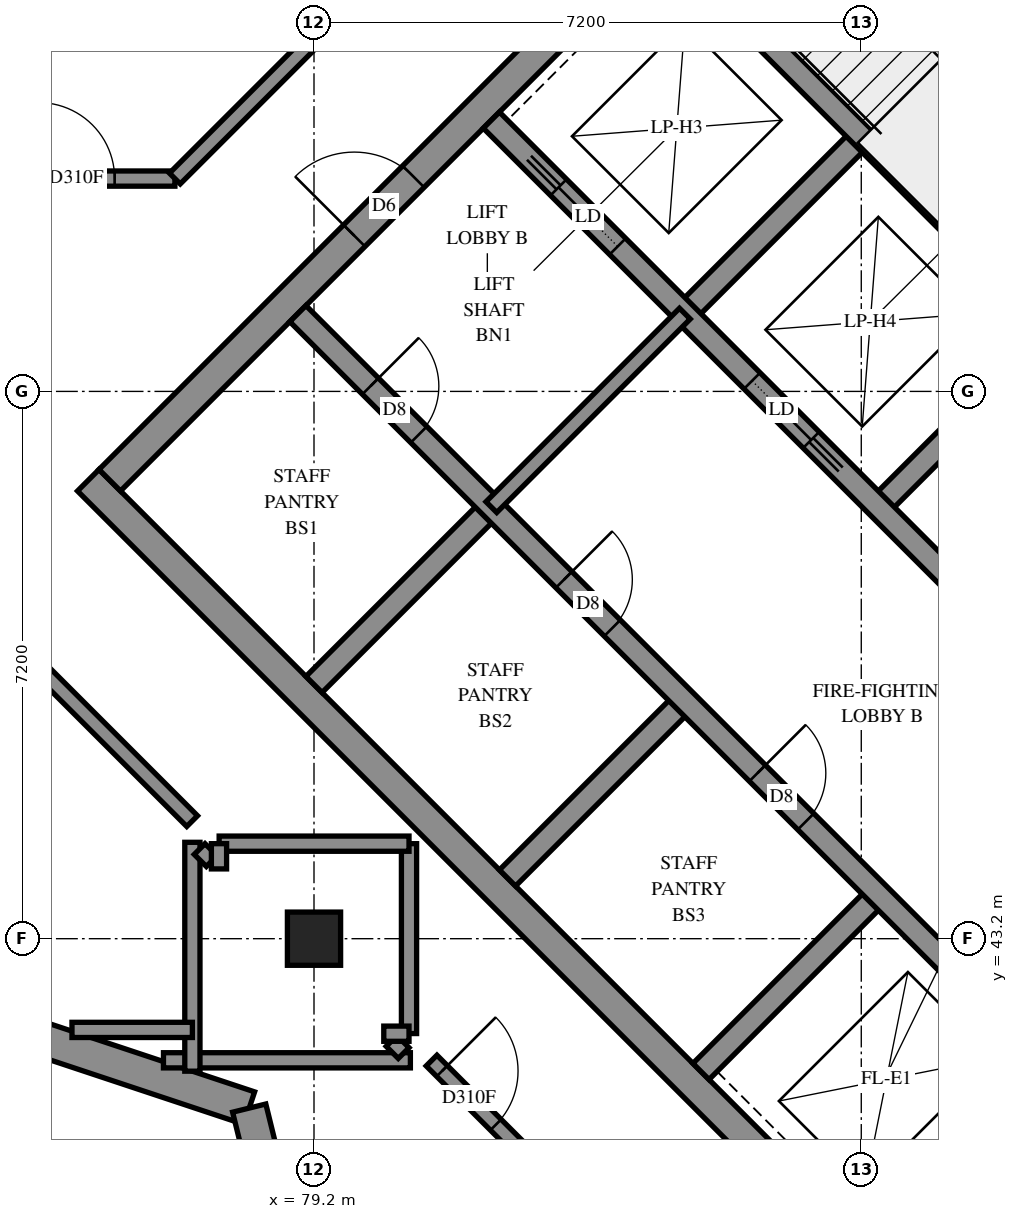
"""IFC4 building model, lengths in metres.
Left out: names, types, materials, properties, quantities, classifications, styles, units other than length and angle.
Written with IfcOpenShell. Run it as: python <this file> out.ifc"""

import sys

from ifc_helpers import new_model, si_unit, direction, frame, frame_2d, origin, origin_2d, place, context, subcontext, project, spatial, polyline, rectangle, outline, extrude, element, fill, save


model = new_model("IFC4")
c1 = context("Model", 3, precision=1e-05, world=origin(), true_north=direction((0.0, 1.0)))
c2 = subcontext(c1, "Body", "Model", "MODEL_VIEW")
j1 = project(units=[si_unit("LENGTHUNIT", "METRE"), si_unit("PLANEANGLEUNIT", "RADIAN")], contexts=[c1])
p1 = place(None, origin())
s1 = spatial("IfcSite", under=j1, at=p1, CompositionType="ELEMENT")
p2 = place(p1, origin())
s2 = spatial("IfcBuilding", under=s1, at=p2, CompositionType="ELEMENT")
p3 = place(p2, frame((0.0, 0.0, 277.8)))
s3 = spatial("IfcBuildingStorey", under=s2, at=p3, CompositionType="ELEMENT", Elevation=277.8)
p4 = place(p3, frame((79.2, 43.2, 0.0), z_axis=(0.0, 0.0, 1.0), x_axis=(1.0, 0.0, 0.0)))
e1 = element("IfcColumn", 1, at=p4, inside=s3, PredefinedType="COLUMN", context=c2, shape_type="SweptSolid", body=[
    extrude(rectangle(XDim=0.7, YDim=0.7, at=origin_2d()), origin(), (0.0, 0.0, 1.0), 3.1),
])
p5 = place(p3, frame((76.23, 49.231, -0.3), z_axis=(0.0, 0.0, 1.0), x_axis=(0.7071034917, -0.7071100706, 0.0)))
e2 = element("IfcWall", 2, at=p5, inside=s3, PredefinedType="SHEAR", context=c2, shape_type="SweptSolid", body=[
    extrude(rectangle(XDim=15.2, YDim=0.4, at=frame_2d((7.6, 0.0))), origin(), (0.0, 0.0, 1.0), 2.7),
])
p6 = place(p3, frame((86.695, 59.696, -0.3), z_axis=(0.0, 0.0, 1.0), x_axis=(0.7071100706, -0.7071034917, 0.0)))
e3 = element("IfcWall", 3, at=p6, inside=s3, PredefinedType="SHEAR", context=c2, shape_type="SweptSolid", body=[
    extrude(rectangle(XDim=15.2, YDim=0.4, at=frame_2d((7.6, 0.0))), origin(), (0.0, 0.0, 1.0), 2.7),
])
p7 = place(p6, frame((10.4, 0.0, 0.3)))
e4 = element("IfcOpeningElement", 4, at=p7, cuts=e3, PredefinedType="OPENING", context=c2, shape_type="SweptSolid", body=[
    extrude(rectangle(XDim=0.8, YDim=2.1, at=frame_2d((0.4, 1.05))), frame((0.0, 0.21, 0.0), z_axis=(0.0, -1.0, 0.0), x_axis=(1.0, 0.0, 0.0)), (0.0, 0.0, 1.0), 0.42),
])
p8 = place(p3, frame((76.513, 49.231, -0.3), z_axis=(0.0, 0.0, 1.0), x_axis=(0.7071067812, 0.7071067812, 0.0)))
e5 = element("IfcWall", 5, at=p8, inside=s3, PredefinedType="SHEAR", context=c2, shape_type="SweptSolid", body=[
    extrude(rectangle(XDim=14.4, YDim=0.4, at=frame_2d((7.2, 0.0))), origin(), (0.0, 0.0, 1.0), 2.7),
])
p9 = place(p8, frame((4.55, 0.0, 0.3)))
e6 = element("IfcOpeningElement", 6, at=p9, cuts=e5, PredefinedType="OPENING", context=c2, shape_type="SweptSolid", body=[
    extrude(rectangle(XDim=1.1, YDim=2.1, at=frame_2d((0.55, 1.05))), frame((0.0, 0.21, 0.0), z_axis=(0.0, -1.0, 0.0), x_axis=(1.0, 0.0, 0.0)), (0.0, 0.0, 1.0), 0.42),
])
p10 = place(p8, frame((11.35, 0.0, 0.3)))
e7 = element("IfcOpeningElement", 7, at=p10, cuts=e5, PredefinedType="OPENING", context=c2, shape_type="SweptSolid", body=[
    extrude(rectangle(XDim=1.1, YDim=2.1, at=frame_2d((0.55, 1.05))), frame((0.0, 0.21, 0.0), z_axis=(0.0, -1.0, 0.0), x_axis=(1.0, 0.0, 0.0)), (0.0, 0.0, 1.0), 0.42),
])
p11 = place(p3, frame((86.978, 38.766, -0.3), z_axis=(0.0, 0.0, 1.0), x_axis=(0.7071067812, 0.7071067812, 0.0)))
e8 = element("IfcWall", 8, at=p11, inside=s3, PredefinedType="SHEAR", context=c2, shape_type="SweptSolid", body=[
    extrude(rectangle(XDim=14.4, YDim=0.4, at=frame_2d((7.2, 0.0))), origin(), (0.0, 0.0, 1.0), 2.7),
])
p12 = place(p11, frame((4.55, 0.0, 0.3)))
e9 = element("IfcOpeningElement", 9, at=p12, cuts=e8, PredefinedType="OPENING", context=c2, shape_type="SweptSolid", body=[
    extrude(rectangle(XDim=1.1, YDim=2.1, at=frame_2d((0.55, 1.05))), frame((0.0, 0.21, 0.0), z_axis=(0.0, -1.0, 0.0), x_axis=(1.0, 0.0, 0.0)), (0.0, 0.0, 1.0), 0.42),
])
p13 = place(p11, frame((11.35, 0.0, 0.3)))
e10 = element("IfcOpeningElement", 10, at=p13, cuts=e8, PredefinedType="OPENING", context=c2, shape_type="SweptSolid", body=[
    extrude(rectangle(XDim=1.1, YDim=2.1, at=frame_2d((0.55, 1.05))), frame((0.0, 0.21, 0.0), z_axis=(0.0, -1.0, 0.0), x_axis=(1.0, 0.0, 0.0)), (0.0, 0.0, 1.0), 0.42),
])
for number, where, z_axis, x_axis in (
    (11, (79.2, 46.544, 0.0), (0.0, 0.0, 1.0), (0.707, 0.707, 0.0)),
    (12, (84.079, 51.423, 0.0), (0.0, 0.0, 1.0), (0.707, 0.707, 0.0)),
):
    element("IfcWall", number, at=place(p3, frame(where, z_axis=z_axis, x_axis=x_axis)), inside=s3, PredefinedType="SOLIDWALL", context=c2, shape_type="SweptSolid", body=[
        extrude(rectangle(XDim=3.3, YDim=0.3, at=frame_2d((1.65, 0.0))), origin(), (0.0, 0.0, 1.0), 3.1),
    ])
p14 = place(p3, frame((81.746, 43.999, 0.0), z_axis=(0.0, 0.0, 1.0), x_axis=(0.7071067812, 0.7071067812, 0.0)))
e13 = element("IfcWall", 13, at=p14, inside=s3, PredefinedType="SOLIDWALL", context=c2, shape_type="SweptSolid", body=[
    extrude(rectangle(XDim=3.3, YDim=0.3, at=frame_2d((1.65, 0.0))), origin(), (0.0, 0.0, 1.0), 3.1),
])
p15 = place(p3, frame((86.625, 48.878, 0.0), z_axis=(0.0, 0.0, 1.0), x_axis=(0.7071067812, 0.7071067812, 0.0)))
e14 = element("IfcWall", 14, at=p15, inside=s3, PredefinedType="SOLIDWALL", context=c2, shape_type="SweptSolid", body=[
    extrude(rectangle(XDim=3.3, YDim=0.3, at=frame_2d((1.65, 0.0))), origin(), (0.0, 0.0, 1.0), 3.1),
])
p16 = place(p3, frame((84.291, 41.453, 0.0), z_axis=(0.0, 0.0, 1.0), x_axis=(0.7071067812, 0.7071067812, 0.0)))
e15 = element("IfcWall", 15, at=p16, inside=s3, PredefinedType="SOLIDWALL", context=c2, shape_type="SweptSolid", body=[
    extrude(rectangle(XDim=3.3, YDim=0.3, at=frame_2d((1.65, 0.0))), origin(), (0.0, 0.0, 1.0), 3.1),
])
p17 = place(p3, frame((78.988, 51.423, 0.0), z_axis=(0.0, 0.0, 1.0), x_axis=(0.7071067812, -0.7071067812, 0.0)))
e16 = element("IfcWall", 16, at=p17, inside=s3, PredefinedType="SOLIDWALL", context=c2, shape_type="SweptSolid", body=[
    extrude(rectangle(XDim=14.4, YDim=0.3, at=frame_2d((7.2, 0.0))), origin(), (0.0, 0.0, 1.0), 3.1),
])
p18 = place(p17, frame((1.35, 0.0, 0.0)))
e17 = element("IfcOpeningElement", 17, at=p18, cuts=e16, PredefinedType="OPENING", context=c2, shape_type="SweptSolid", body=[
    extrude(rectangle(XDim=0.9, YDim=2.1, at=frame_2d((0.45, 1.05))), frame((0.0, 0.16, 0.0), z_axis=(0.0, -1.0, 0.0), x_axis=(1.0, 0.0, 0.0)), (0.0, 0.0, 1.0), 0.32),
])
p19 = place(p17, frame((4.95, 0.0, 0.0)))
e18 = element("IfcOpeningElement", 18, at=p19, cuts=e16, PredefinedType="OPENING", context=c2, shape_type="SweptSolid", body=[
    extrude(rectangle(XDim=0.9, YDim=2.1, at=frame_2d((0.45, 1.05))), frame((0.0, 0.16, 0.0), z_axis=(0.0, -1.0, 0.0), x_axis=(1.0, 0.0, 0.0)), (0.0, 0.0, 1.0), 0.32),
])
p20 = place(p17, frame((8.55, 0.0, 0.0)))
e19 = element("IfcOpeningElement", 19, at=p20, cuts=e16, PredefinedType="OPENING", context=c2, shape_type="SweptSolid", body=[
    extrude(rectangle(XDim=0.9, YDim=2.1, at=frame_2d((0.45, 1.05))), frame((0.0, 0.16, 0.0), z_axis=(0.0, -1.0, 0.0), x_axis=(1.0, 0.0, 0.0)), (0.0, 0.0, 1.0), 0.32),
])
p21 = place(p17, frame((12.05, 0.0, 0.0)))
e20 = element("IfcOpeningElement", 20, at=p21, cuts=e16, PredefinedType="OPENING", context=c2, shape_type="SweptSolid", body=[
    extrude(rectangle(XDim=1.1, YDim=2.1, at=frame_2d((0.55, 1.05))), frame((0.0, 0.16, 0.0), z_axis=(0.0, -1.0, 0.0), x_axis=(1.0, 0.0, 0.0)), (0.0, 0.0, 1.0), 0.32),
])
p22 = place(p3, frame((81.534, 53.969, 0.0), z_axis=(0.0, 0.0, 1.0), x_axis=(0.707103309, -0.7071102534, 0.0)))
e21 = element("IfcWall", 21, at=p22, inside=s3, PredefinedType="SOLIDWALL", context=c2, shape_type="SweptSolid", body=[
    extrude(rectangle(XDim=14.4, YDim=0.3, at=frame_2d((7.2, 0.0))), origin(), (0.0, 0.0, 1.0), 3.1),
])
p23 = place(p22, frame((8.55, 0.0, 0.0)))
e22 = element("IfcOpeningElement", 22, at=p23, cuts=e21, PredefinedType="OPENING", context=c2, shape_type="SweptSolid", body=[
    extrude(rectangle(XDim=0.9, YDim=2.1, at=frame_2d((0.45, 1.05))), frame((0.0, 0.16, 0.0), z_axis=(0.0, -1.0, 0.0), x_axis=(1.0, 0.0, 0.0)), (0.0, 0.0, 1.0), 0.32),
])
p24 = place(p22, frame((1.25, 0.0, 0.0)))
e23 = element("IfcOpeningElement", 23, at=p24, cuts=e21, PredefinedType="OPENING", context=c2, shape_type="SweptSolid", body=[
    extrude(rectangle(XDim=1.1, YDim=2.1, at=frame_2d((0.55, 1.05))), frame((0.0, 0.16, 0.0), z_axis=(0.0, -1.0, 0.0), x_axis=(1.0, 0.0, 0.0)), (0.0, 0.0, 1.0), 0.32),
])
p25 = place(p22, frame((4.85, 0.0, 0.0)))
e24 = element("IfcOpeningElement", 24, at=p25, cuts=e21, PredefinedType="OPENING", context=c2, shape_type="SweptSolid", body=[
    extrude(rectangle(XDim=1.1, YDim=2.1, at=frame_2d((0.55, 1.05))), frame((0.0, 0.16, 0.0), z_axis=(0.0, -1.0, 0.0), x_axis=(1.0, 0.0, 0.0)), (0.0, 0.0, 1.0), 0.32),
])
p26 = place(p22, frame((12.05, 0.0, 0.0)))
e25 = element("IfcOpeningElement", 25, at=p26, cuts=e21, PredefinedType="OPENING", context=c2, shape_type="SweptSolid", body=[
    extrude(rectangle(XDim=1.1, YDim=2.1, at=frame_2d((0.55, 1.05))), frame((0.0, 0.16, 0.0), z_axis=(0.0, -1.0, 0.0), x_axis=(1.0, 0.0, 0.0)), (0.0, 0.0, 1.0), 0.32),
])
p27 = place(p3, frame((83.867, 56.302, 0.0), z_axis=(0.0, 0.0, 1.0), x_axis=(0.7071137256, -0.7070998367, 0.0)))
e26 = element("IfcWall", 26, at=p27, inside=s3, PredefinedType="SOLIDWALL", context=c2, shape_type="SweptSolid", body=[
    extrude(rectangle(XDim=7.2, YDim=0.3, at=frame_2d((3.6, 0.0))), origin(), (0.0, 0.0, 1.0), 3.1),
])
p28 = place(p3, frame((74.557, 42.231, 0.0), z_axis=(0.0, 0.0, 1.0), x_axis=(0.9489708056, -0.3153639328, 0.0)))
e27 = element("IfcWall", 27, at=p28, inside=s3, PredefinedType="SOLIDWALL", context=c2, shape_type="SweptSolid", body=[
    extrude(outline(polyline([(0.056, -0.225), (3.87, -0.225), (4.119, 0.225), (-0.056, 0.225), (0.056, -0.225)])), origin(), (0.0, 0.0, 1.0), 3.1),
])
p29 = place(p3, frame((78.348, 40.971, 0.0), z_axis=(0.0, 0.0, 1.0), x_axis=(0.239085216, -0.9709985888, 0.0)))
e28 = element("IfcWall", 28, at=p29, inside=s3, PredefinedType="SOLIDWALL", context=c2, shape_type="SweptSolid", body=[
    extrude(outline(polyline([(0.124, -0.225), (4.762, -0.225), (4.489, 0.225), (-0.124, 0.225), (0.124, -0.225)])), origin(), (0.0, 0.0, 1.0), 3.1),
])
p30 = place(p29, frame((1.951, 0.0, 0.7)))
e29 = element("IfcOpeningElement", 29, at=p30, cuts=e28, PredefinedType="OPENING", context=c2, shape_type="SweptSolid", body=[
    extrude(rectangle(XDim=1.8, YDim=1.8, at=frame_2d((0.9, 0.9))), frame((0.0, 0.235, 0.0), z_axis=(0.0, -1.0, 0.0), x_axis=(1.0, 0.0, 0.0)), (0.0, 0.0, 1.0), 0.47),
])
p31 = place(p3, frame((81.534, 48.878, 0.0), z_axis=(0.0, 0.0, 1.0), x_axis=(0.707092892, 0.7071206701, 0.0)))
e30 = element("IfcWall", 30, at=p31, inside=s3, PredefinedType="PARTITIONING", context=c2, shape_type="SweptSolid", body=[
    extrude(rectangle(XDim=3.6, YDim=0.2, at=frame_2d((1.8, 0.0))), origin(), (0.0, 0.0, 1.0), 3.1),
])
p32 = place(p3, frame((86.306, 33.287, 0.0), z_axis=(0.0, 0.0, 1.0), x_axis=(0.7071020418, 0.7071115206, 0.0)))
e31 = element("IfcWall", 31, at=p32, inside=s3, PredefinedType="PARTITIONING", context=c2, shape_type="SweptSolid", body=[
    extrude(rectangle(XDim=10.55, YDim=0.2, at=frame_2d((5.275, 0.0))), origin(), (0.0, 0.0, 1.0), 3.1),
])
p33 = place(p3, frame((80.747, 41.597, 0.0), z_axis=(0.0, 0.0, 1.0), x_axis=(0.7071067812, -0.7071067812, 0.0)))
e32 = element("IfcWall", 32, at=p33, inside=s3, PredefinedType="PARTITIONING", context=c2, shape_type="SweptSolid", body=[
    extrude(rectangle(XDim=8.607, YDim=0.2, at=frame_2d((4.303, 0.0))), origin(), (0.0, 0.0, 1.0), 3.1),
])
p34 = place(p33, frame((0.195, 0.0, 0.0)))
e33 = element("IfcOpeningElement", 33, at=p34, cuts=e32, PredefinedType="OPENING", context=c2, shape_type="SweptSolid", body=[
    extrude(rectangle(XDim=1.0, YDim=2.1, at=frame_2d((0.5, 1.05))), frame((0.0, 0.11, 0.0), z_axis=(0.0, -1.0, 0.0), x_axis=(1.0, 0.0, 0.0)), (0.0, 0.0, 1.0), 0.22),
])
p35 = place(p33, frame((3.175, 0.0, 0.0)))
e34 = element("IfcOpeningElement", 34, at=p35, cuts=e32, PredefinedType="OPENING", context=c2, shape_type="SweptSolid", body=[
    extrude(rectangle(XDim=1.0, YDim=2.1, at=frame_2d((0.5, 1.05))), frame((0.0, 0.11, 0.0), z_axis=(0.0, -1.0, 0.0), x_axis=(1.0, 0.0, 0.0)), (0.0, 0.0, 1.0), 0.22),
])
p36 = place(p3, frame((86.839, 35.511, 0.0), z_axis=(0.0, 0.0, 1.0), x_axis=(0.707223053, 0.7069904903, 0.0)))
e35 = element("IfcWall", 35, at=p36, inside=s3, PredefinedType="PARTITIONING", context=c2, shape_type="SweptSolid", body=[
    extrude(rectangle(XDim=8.6, YDim=0.2, at=frame_2d((4.3, 0.0))), origin(), (0.0, 0.0, 1.0), 3.1),
])
p37 = place(p36, frame((7.343, 0.0, 0.0)))
e36 = element("IfcOpeningElement", 36, at=p37, cuts=e35, PredefinedType="OPENING", context=c2, shape_type="SweptSolid", body=[
    extrude(rectangle(XDim=1.0, YDim=2.1, at=frame_2d((0.5, 1.05))), frame((0.0, 0.11, 0.0), z_axis=(0.0, -1.0, 0.0), x_axis=(1.0, 0.0, 0.0)), (0.0, 0.0, 1.0), 0.22),
])
p38 = place(p3, frame((74.347, 47.997, 0.0), z_axis=(0.0, 0.0, 1.0), x_axis=(0.7071067812, -0.7071067812, 0.0)))
e37 = element("IfcWall", 37, at=p38, inside=s3, PredefinedType="PARTITIONING", context=c2, shape_type="SweptSolid", body=[
    extrude(rectangle(XDim=4.596, YDim=0.2, at=frame_2d((2.298, 0.0))), origin(), (0.0, 0.0, 1.0), 3.1),
])
p39 = place(p38, frame((0.401, 0.0, 0.0)))
e38 = element("IfcOpeningElement", 38, at=p39, cuts=e37, PredefinedType="OPENING", context=c2, shape_type="SweptSolid", body=[
    extrude(rectangle(XDim=1.0, YDim=2.1, at=frame_2d((0.5, 1.05))), frame((0.0, 0.11, 0.0), z_axis=(0.0, -1.0, 0.0), x_axis=(1.0, 0.0, 0.0)), (0.0, 0.0, 1.0), 0.22),
])
p40 = place(p3, frame((77.219, 41.6, 0.0), z_axis=(0.0, 0.0, 1.0), x_axis=(1.0, 0.0, 0.0)))
e39 = element("IfcWall", 39, at=p40, inside=s3, PredefinedType="PARTITIONING", context=c2, shape_type="SweptSolid", body=[
    extrude(rectangle(XDim=3.248, YDim=0.2, at=frame_2d((1.624, 0.0))), origin(), (0.0, 0.0, 1.0), 3.1),
])
p41 = place(p3, frame((74.402, 53.2, 0.0), z_axis=(0.0, 0.0, 1.0), x_axis=(1.0, 0.0, 0.0)))
e40 = element("IfcWall", 40, at=p41, inside=s3, PredefinedType="PARTITIONING", context=c2, shape_type="SweptSolid", body=[
    extrude(rectangle(XDim=2.968, YDim=0.2, at=frame_2d((1.484, 0.0))), origin(), (0.0, 0.0, 1.0), 3.1),
])
p42 = place(p41, frame((1.175, 0.0, 0.0)))
e41 = element("IfcOpeningElement", 41, at=p42, cuts=e40, PredefinedType="OPENING", context=c2, shape_type="SweptSolid", body=[
    extrude(rectangle(XDim=1.0, YDim=2.1, at=frame_2d((0.5, 1.05))), frame((0.0, 0.11, 0.0), z_axis=(0.0, -1.0, 0.0), x_axis=(1.0, 0.0, 0.0)), (0.0, 0.0, 1.0), 0.22),
])
p43 = place(p3, frame((77.6, 41.457, 0.0), z_axis=(0.0, 0.0, 1.0), x_axis=(0.0, 1.0, 0.0)))
e42 = element("IfcWall", 42, at=p43, inside=s3, PredefinedType="PARTITIONING", context=c2, shape_type="SweptSolid", body=[
    extrude(rectangle(XDim=3.011, YDim=0.2, at=frame_2d((1.506, 0.0))), origin(), (0.0, 0.0, 1.0), 3.1),
])
p44 = place(p3, frame((77.37, 53.2, 0.0), z_axis=(0.0, 0.0, 1.0), x_axis=(0.7071067812, 0.7071067812, 0.0)))
e43 = element("IfcWall", 43, at=p44, inside=s3, PredefinedType="PARTITIONING", context=c2, shape_type="SweptSolid", body=[
    extrude(rectangle(XDim=2.786, YDim=0.2, at=frame_2d((1.393, 0.0))), origin(), (0.0, 0.0, 1.0), 3.1),
])
for number, where, z_axis, x_axis in (
    (44, (80.45, 41.952, 0.0), (0.0, 0.0, 1.0), (0.0, 1.0, 0.0)),
    (45, (77.952, 44.45, 0.0), (0.0, 0.0, 1.0), (1.0, 0.0, 0.0)),
):
    element("IfcWall", number, at=place(p3, frame(where, z_axis=z_axis, x_axis=x_axis)), inside=s3, PredefinedType="PARTITIONING", context=c2, shape_type="SweptSolid", body=[
        extrude(rectangle(XDim=2.498, YDim=0.2, at=frame_2d((1.249, 0.0))), origin(), (0.0, 0.0, 1.0), 3.1),
    ])
p45 = place(p3, frame((76.016, 42.0, 0.0), z_axis=(0.0, 0.0, 1.0), x_axis=(1.0, 0.0, 0.0)))
e46 = element("IfcWall", 46, at=p45, inside=s3, PredefinedType="PARTITIONING", context=c2, shape_type="SweptSolid", body=[
    extrude(rectangle(XDim=1.584, YDim=0.2, at=frame_2d((0.792, 0.0))), origin(), (0.0, 0.0, 1.0), 3.1),
])
for number, where, z_axis, x_axis in (
    (47, (80.221, 41.855, 0.0), (0.0, 0.0, 1.0), (0.707, -0.707, 0.0)),
    (48, (77.695, 44.38, 0.0), (0.0, 0.0, 1.0), (0.707, -0.707, 0.0)),
):
    element("IfcWall", number, at=place(p3, frame(where, z_axis=z_axis, x_axis=x_axis)), inside=s3, PredefinedType="PARTITIONING", context=c2, shape_type="SweptSolid", body=[
        extrude(rectangle(XDim=0.225, YDim=0.2, at=frame_2d((0.112, 0.0))), origin(), (0.0, 0.0, 1.0), 3.1),
    ])
for number, where, z_axis, x_axis in (
    (49, (80.118, 41.95, 0.0), (0.0, 0.0, 1.0), (1.0, 0.0, 0.0)),
    (50, (77.95, 44.118, 0.0), (0.0, 0.0, 1.0), (0.0, 1.0, 0.0)),
):
    element("IfcWall", number, at=place(p3, frame(where, z_axis=z_axis, x_axis=x_axis)), inside=s3, PredefinedType="PARTITIONING", context=c2, shape_type="SweptSolid", body=[
        extrude(rectangle(XDim=0.332, YDim=0.2, at=frame_2d((0.166, 0.0))), origin(), (0.0, 0.0, 1.0), 3.1),
    ])
p46 = place(p9, origin())
e51 = element("IfcDoor", 51, at=p46, inside=s3, OperationType="DOUBLE_DOOR_SINGLE_SWING", PredefinedType="DOOR", context=c2, shape_type="SweptSolid", body=[
    extrude(rectangle(XDim=1.1, YDim=2.1, at=frame_2d((0.55, 1.05))), frame((0.0, 0.025, 0.0), z_axis=(0.0, -1.0, 0.0), x_axis=(1.0, 0.0, 0.0)), (0.0, 0.0, 1.0), 0.05),
])
fill(e6, e51)
p47 = place(p18, origin())
e52 = element("IfcDoor", 52, at=p47, inside=s3, OperationType="SINGLE_SWING_LEFT", PredefinedType="DOOR", context=c2, shape_type="SweptSolid", body=[
    extrude(rectangle(XDim=0.9, YDim=2.1, at=frame_2d((0.45, 1.05))), frame((0.0, 0.025, 0.0), z_axis=(0.0, -1.0, 0.0), x_axis=(1.0, 0.0, 0.0)), (0.0, 0.0, 1.0), 0.05),
])
fill(e17, e52)
p48 = place(p19, origin())
e53 = element("IfcDoor", 53, at=p48, inside=s3, OperationType="SINGLE_SWING_LEFT", PredefinedType="DOOR", context=c2, shape_type="SweptSolid", body=[
    extrude(rectangle(XDim=0.9, YDim=2.1, at=frame_2d((0.45, 1.05))), frame((0.0, 0.025, 0.0), z_axis=(0.0, -1.0, 0.0), x_axis=(1.0, 0.0, 0.0)), (0.0, 0.0, 1.0), 0.05),
])
fill(e18, e53)
p49 = place(p20, origin())
e54 = element("IfcDoor", 54, at=p49, inside=s3, OperationType="SINGLE_SWING_LEFT", PredefinedType="DOOR", context=c2, shape_type="SweptSolid", body=[
    extrude(rectangle(XDim=0.9, YDim=2.1, at=frame_2d((0.45, 1.05))), frame((0.0, 0.025, 0.0), z_axis=(0.0, -1.0, 0.0), x_axis=(1.0, 0.0, 0.0)), (0.0, 0.0, 1.0), 0.05),
])
fill(e19, e54)
p50 = place(p24, origin())
e55 = element("IfcDoor", 55, at=p50, inside=s3, OperationType="SLIDING_TO_LEFT", PredefinedType="DOOR", context=c2, shape_type="SweptSolid", body=[
    extrude(rectangle(XDim=1.1, YDim=2.1, at=frame_2d((0.55, 1.05))), frame((0.0, 0.025, 0.0), z_axis=(0.0, -1.0, 0.0), x_axis=(1.0, 0.0, 0.0)), (0.0, 0.0, 1.0), 0.05),
])
fill(e23, e55)
p51 = place(p25, origin())
e56 = element("IfcDoor", 56, at=p51, inside=s3, OperationType="SLIDING_TO_RIGHT", PredefinedType="DOOR", context=c2, shape_type="SweptSolid", body=[
    extrude(rectangle(XDim=1.1, YDim=2.1, at=frame_2d((0.55, 1.05))), frame((0.0, 0.025, 0.0), z_axis=(0.0, -1.0, 0.0), x_axis=(1.0, 0.0, 0.0)), (0.0, 0.0, 1.0), 0.05),
])
fill(e24, e56)
p52 = place(p42, origin())
e57 = element("IfcDoor", 57, at=p52, inside=s3, OperationType="SINGLE_SWING_LEFT", PredefinedType="DOOR", context=c2, shape_type="SweptSolid", body=[
    extrude(rectangle(XDim=1.0, YDim=2.1, at=frame_2d((0.5, 1.05))), frame((0.0, 0.025, 0.0), z_axis=(0.0, -1.0, 0.0), x_axis=(1.0, 0.0, 0.0)), (0.0, 0.0, 1.0), 0.05),
])
fill(e41, e57)
p53 = place(p34, origin())
e58 = element("IfcDoor", 58, at=p53, inside=s3, OperationType="SINGLE_SWING_LEFT", PredefinedType="DOOR", context=c2, shape_type="SweptSolid", body=[
    extrude(rectangle(XDim=1.0, YDim=2.1, at=frame_2d((0.5, 1.05))), frame((0.0, 0.025, 0.0), z_axis=(0.0, -1.0, 0.0), x_axis=(1.0, 0.0, 0.0)), (0.0, 0.0, 1.0), 0.05),
])
fill(e33, e58)
save(model, sys.argv[1])
